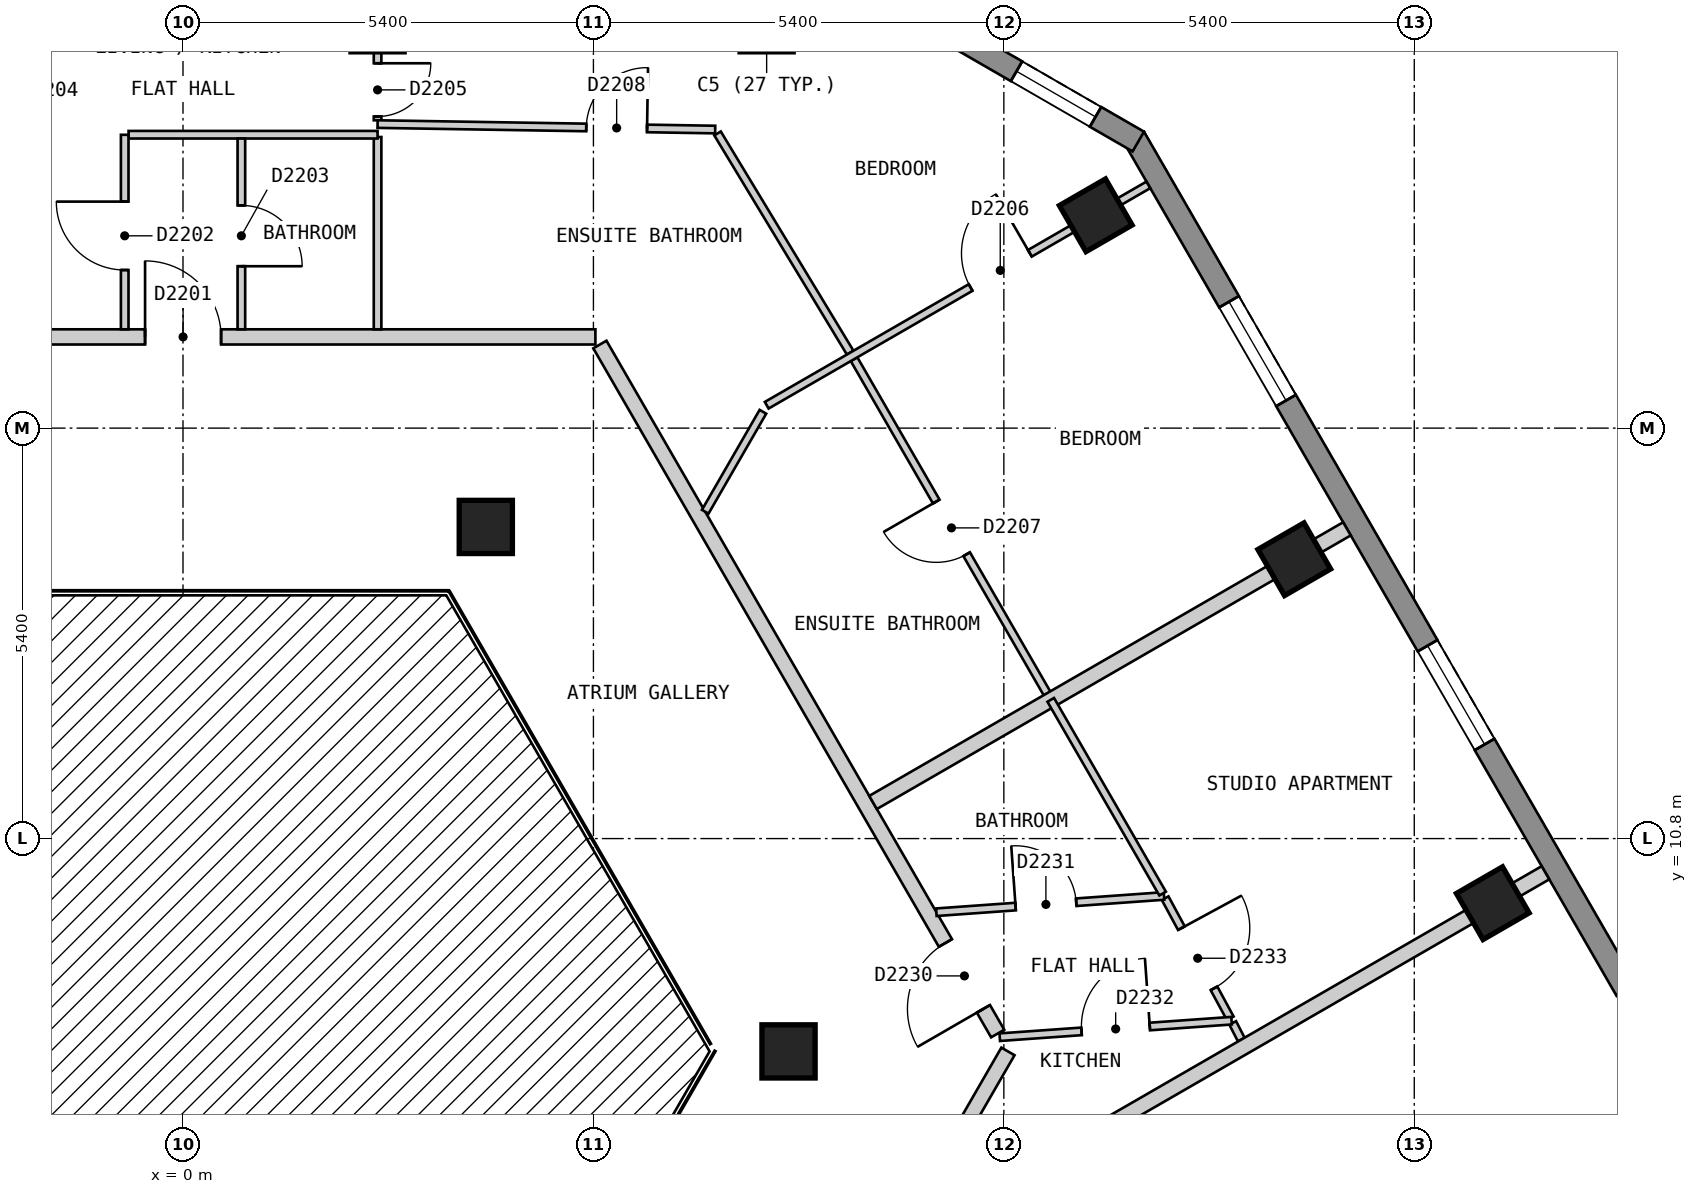
"""IFC4 building model, lengths in metres.
Left out: names, types, materials, properties, quantities, classifications, styles, units other than length and angle.
Written with IfcOpenShell. Run it as: python <this file> out.ifc"""

import sys

from ifc_helpers import new_model, si_unit, direction, frame, frame_2d, origin, origin_2d, place, context, subcontext, project, spatial, polyline, rectangle, outline, extrude, element, fill, save


model = new_model("IFC4")
c1 = context("Model", 3, precision=1e-05, world=origin(), true_north=direction((0.0, 1.0)))
c2 = subcontext(c1, "Body", "Model", "MODEL_VIEW")
j1 = project(units=[si_unit("LENGTHUNIT", "METRE"), si_unit("PLANEANGLEUNIT", "RADIAN")], contexts=[c1])
p1 = place(None, origin())
s1 = spatial("IfcSite", under=j1, at=p1, CompositionType="ELEMENT")
p2 = place(p1, origin())
s2 = spatial("IfcBuilding", under=s1, at=p2, CompositionType="ELEMENT")
p3 = place(p2, frame((0.0, 0.0, 223.8)))
s3 = spatial("IfcBuildingStorey", under=s2, at=p3, CompositionType="ELEMENT", Elevation=223.8)
for number, where, z_axis, x_axis in (
    (1, (17.233, 9.95, 0.0), (0.0, 0.0, 1.0), (-0.5, 0.866, 0.0)),
    (2, (14.621, 14.475, 0.0), (0.0, 0.0, 1.0), (-0.5, 0.866, 0.0)),
    (3, (12.009, 19.0, 0.0), (0.0, 0.0, 1.0), (-0.5, 0.866, 0.0)),
    (4, (7.967, 8.0, 0.0), (0.0, 0.0, 1.0), (1.0, 0.0, 0.0)),
    (5, (3.984, 14.9, 0.0), (0.0, 0.0, 1.0), (1.0, 0.0, 0.0)),
):
    element("IfcColumn", number, at=place(p3, frame(where, z_axis=z_axis, x_axis=x_axis)), inside=s3, PredefinedType="COLUMN", context=c2, shape_type="SweptSolid", body=[
        extrude(rectangle(XDim=0.7, YDim=0.7, at=origin_2d()), origin(), (0.0, 0.0, 1.0), 3.0),
    ])
p4 = place(p3, frame((23.599, 0.825, 0.0), z_axis=(0.0, 0.0, 1.0), x_axis=(-0.500003656944, 0.866023292436, 0.0)))
e6 = element("IfcWall", 6, at=p4, inside=s3, PredefinedType="SOLIDWALL", context=c2, shape_type="SweptSolid", body=[
    extrude(outline(polyline([(0.0, -0.15), (22.17, -0.15), (22.09, 0.15), (0.08, 0.15), (0.0, -0.15)])), origin(), (0.0, 0.0, 1.0), 2.7),
])
p5 = place(p4, frame((2.497, 0.0, 0.15)))
e7 = element("IfcOpeningElement", 7, at=p5, cuts=e6, PredefinedType="OPENING", context=c2, shape_type="SweptSolid", body=[
    extrude(rectangle(XDim=1.5, YDim=2.1, at=frame_2d((0.75, 1.05))), frame((0.0, 0.16, 0.0), z_axis=(0.0, -1.0, 0.0), x_axis=(1.0, 0.0, 0.0)), (0.0, 0.0, 1.0), 0.32),
])
p6 = place(p4, frame((7.723, 0.0, 0.15)))
e8 = element("IfcOpeningElement", 8, at=p6, cuts=e6, PredefinedType="OPENING", context=c2, shape_type="SweptSolid", body=[
    extrude(rectangle(XDim=1.5, YDim=2.1, at=frame_2d((0.75, 1.05))), frame((0.0, 0.16, 0.0), z_axis=(0.0, -1.0, 0.0), x_axis=(1.0, 0.0, 0.0)), (0.0, 0.0, 1.0), 0.32),
])
p7 = place(p4, frame((12.948, 0.0, 0.15)))
e9 = element("IfcOpeningElement", 9, at=p7, cuts=e6, PredefinedType="OPENING", context=c2, shape_type="SweptSolid", body=[
    extrude(rectangle(XDim=1.5, YDim=2.1, at=frame_2d((0.75, 1.05))), frame((0.0, 0.16, 0.0), z_axis=(0.0, -1.0, 0.0), x_axis=(1.0, 0.0, 0.0)), (0.0, 0.0, 1.0), 0.32),
])
p8 = place(p4, frame((18.173, 0.0, 0.15)))
e10 = element("IfcOpeningElement", 10, at=p8, cuts=e6, PredefinedType="OPENING", context=c2, shape_type="SweptSolid", body=[
    extrude(rectangle(XDim=1.5, YDim=2.1, at=frame_2d((0.75, 1.05))), frame((0.0, 0.16, 0.0), z_axis=(0.0, -1.0, 0.0), x_axis=(1.0, 0.0, 0.0)), (0.0, 0.0, 1.0), 0.32),
])
p9 = place(p3, frame((12.569, 19.97, 0.0), z_axis=(0.0, 0.0, 1.0), x_axis=(-0.866022959057, 0.500004234368, 0.0)))
e11 = element("IfcWall", 11, at=p9, inside=s3, PredefinedType="SOLIDWALL", context=c2, shape_type="SweptSolid", body=[
    extrude(outline(polyline([(0.0, -0.15), (5.0, -0.15), (4.92, 0.15), (0.08, 0.15), (0.0, -0.15)])), origin(), (0.0, 0.0, 1.0), 2.7),
])
p10 = place(p9, frame((0.65, 0.0, 0.15)))
e12 = element("IfcOpeningElement", 12, at=p10, cuts=e11, PredefinedType="OPENING", context=c2, shape_type="SweptSolid", body=[
    extrude(rectangle(XDim=1.2, YDim=2.1, at=frame_2d((0.6, 1.05))), frame((0.0, 0.16, 0.0), z_axis=(0.0, -1.0, 0.0), x_axis=(1.0, 0.0, 0.0)), (0.0, 0.0, 1.0), 0.32),
])
p11 = place(p3, frame((5.485, 17.3, 0.0), z_axis=(0.0, 0.0, 1.0), x_axis=(0.500017221754, -0.866015460572, 0.0)))
e13 = element("IfcWall", 13, at=p11, inside=s3, PredefinedType="PARTITIONING", context=c2, shape_type="SweptSolid", body=[
    extrude(rectangle(XDim=10.468, YDim=0.2, at=frame_2d((5.234, 0.0))), origin(), (0.0, 0.0, 1.0), 2.7),
])
p12 = place(p11, frame((9.092, 0.0, 0.0)))
e14 = element("IfcOpeningElement", 14, at=p12, cuts=e13, PredefinedType="OPENING", context=c2, shape_type="SweptSolid", body=[
    extrude(rectangle(XDim=1.0, YDim=2.1, at=frame_2d((0.5, 1.05))), frame((0.0, 0.11, 0.0), z_axis=(0.0, -1.0, 0.0), x_axis=(1.0, 0.0, 0.0)), (0.0, 0.0, 1.0), 0.22),
])
p13 = place(p3, frame((-5.311, 17.4, 0.0), z_axis=(0.0, 0.0, 1.0), x_axis=(1.0, 0.0, 0.0)))
e15 = element("IfcWall", 15, at=p13, inside=s3, PredefinedType="PARTITIONING", context=c2, shape_type="SweptSolid", body=[
    extrude(rectangle(XDim=10.737, YDim=0.2, at=frame_2d((5.369, 0.0))), origin(), (0.0, 0.0, 1.0), 2.7),
])
p14 = place(p13, frame((4.812, 0.0, 0.0)))
e16 = element("IfcOpeningElement", 16, at=p14, cuts=e15, PredefinedType="OPENING", context=c2, shape_type="SweptSolid", body=[
    extrude(rectangle(XDim=1.0, YDim=2.1, at=frame_2d((0.5, 1.05))), frame((0.0, 0.11, 0.0), z_axis=(0.0, -1.0, 0.0), x_axis=(1.0, 0.0, 0.0)), (0.0, 0.0, 1.0), 0.22),
])
p15 = place(p3, frame((9.354, 5.401, 0.0), z_axis=(0.0, 0.0, 1.0), x_axis=(0.499849222119, 0.866112437936, 0.0)))
e17 = element("IfcWall", 17, at=p15, inside=s3, PredefinedType="PARTITIONING", context=c2, shape_type="SweptSolid", body=[
    extrude(rectangle(XDim=3.001, YDim=0.2, at=frame_2d((1.5, 0.0))), origin(), (0.0, 0.0, 1.0), 2.7),
])
p16 = place(p3, frame((7.033, 20.077, 0.0), z_axis=(0.0, 0.0, 1.0), x_axis=(0.517730137343, -0.855543981854, 0.0)))
e18 = element("IfcWall", 18, at=p16, inside=s3, PredefinedType="PARTITIONING", context=c2, shape_type="SweptSolid", body=[
    extrude(rectangle(XDim=3.371, YDim=0.1, at=frame_2d((1.685, 0.0))), origin(), (0.0, 0.0, 1.0), 2.7),
])
p17 = place(p3, frame((8.829, 17.107, 0.0), z_axis=(0.0, 0.0, 1.0), x_axis=(0.500035512416, -0.866004899711, 0.0)))
e19 = element("IfcWall", 19, at=p17, inside=s3, PredefinedType="PARTITIONING", context=c2, shape_type="SweptSolid", body=[
    extrude(rectangle(XDim=5.175, YDim=0.1, at=frame_2d((2.588, 0.0))), origin(), (0.0, 0.0, 1.0), 2.7),
])
p18 = place(p17, frame((2.163, 0.0, 0.0)))
e20 = element("IfcOpeningElement", 20, at=p18, cuts=e19, PredefinedType="OPENING", context=c2, shape_type="SweptSolid", body=[
    extrude(rectangle(XDim=0.8, YDim=2.1, at=frame_2d((0.4, 1.05))), frame((0.0, 0.06, 0.0), z_axis=(0.0, -1.0, 0.0), x_axis=(1.0, 0.0, 0.0)), (0.0, 0.0, 1.0), 0.12),
])
p19 = place(p3, frame((12.922, 10.016, 0.0), z_axis=(0.0, 0.0, 1.0), x_axis=(0.476510550025, -0.879168752695, 0.0)))
e21 = element("IfcWall", 21, at=p19, inside=s3, PredefinedType="PARTITIONING", context=c2, shape_type="SweptSolid", body=[
    extrude(rectangle(XDim=1.798, YDim=0.1, at=frame_2d((0.899, 0.0))), origin(), (0.0, 0.0, 1.0), 2.7),
])
p20 = place(p19, frame((0.449, 0.0, 0.0)))
e22 = element("IfcOpeningElement", 22, at=p20, cuts=e21, PredefinedType="OPENING", context=c2, shape_type="SweptSolid", body=[
    extrude(rectangle(XDim=0.9, YDim=2.1, at=frame_2d((0.45, 1.05))), frame((0.0, 0.06, 0.0), z_axis=(0.0, -1.0, 0.0), x_axis=(1.0, 0.0, 0.0)), (0.0, 0.0, 1.0), 0.12),
])
p21 = place(p3, frame((13.811, 8.375, 0.0), z_axis=(0.0, 0.0, 1.0), x_axis=(0.457058020142, -0.889436881529, 0.0)))
e23 = element("IfcWall", 23, at=p21, inside=s3, PredefinedType="PARTITIONING", context=c2, shape_type="SweptSolid", body=[
    extrude(rectangle(XDim=0.247, YDim=0.1, at=frame_2d((0.124, 0.0))), origin(), (0.0, 0.0, 1.0), 2.7),
])
p22 = place(p3, frame((2.56, 22.3, 0.0), z_axis=(0.0, 0.0, 1.0), x_axis=(0.0, -1.0, 0.0)))
e24 = element("IfcWall", 24, at=p22, inside=s3, PredefinedType="PARTITIONING", context=c2, shape_type="SweptSolid", body=[
    extrude(rectangle(XDim=2.05, YDim=0.1, at=frame_2d((1.025, 0.0))), origin(), (0.0, 0.0, 1.0), 2.7),
])
p23 = place(p22, frame((1.3, 0.0, 0.0)))
e25 = element("IfcOpeningElement", 25, at=p23, cuts=e24, PredefinedType="OPENING", context=c2, shape_type="SweptSolid", body=[
    extrude(rectangle(XDim=0.7, YDim=2.1, at=frame_2d((0.35, 1.05))), frame((0.0, 0.06, 0.0), z_axis=(0.0, -1.0, 0.0), x_axis=(1.0, 0.0, 0.0)), (0.0, 0.0, 1.0), 0.12),
])
p24 = place(p3, frame((2.56, 20.03, 0.0), z_axis=(0.0, 0.0, 1.0), x_axis=(0.0, -1.0, 0.0)))
e26 = element("IfcWall", 26, at=p24, inside=s3, PredefinedType="PARTITIONING", context=c2, shape_type="SweptSolid", body=[
    extrude(rectangle(XDim=2.53, YDim=0.1, at=frame_2d((1.265, 0.0))), origin(), (0.0, 0.0, 1.0), 2.7),
])
p25 = place(p3, frame((2.56, 20.2, 0.0), z_axis=(0.0, 0.0, 1.0), x_axis=(0.999868576801, -0.016212005615, 0.0)))
e27 = element("IfcWall", 27, at=p25, inside=s3, PredefinedType="PARTITIONING", context=c2, shape_type="SweptSolid", body=[
    extrude(rectangle(XDim=4.442, YDim=0.1, at=frame_2d((2.221, 0.0))), origin(), (0.0, 0.0, 1.0), 2.7),
])
p26 = place(p25, frame((2.746, 0.0, 0.0)))
e28 = element("IfcOpeningElement", 28, at=p26, cuts=e27, PredefinedType="OPENING", context=c2, shape_type="SweptSolid", body=[
    extrude(rectangle(XDim=0.8, YDim=2.1, at=frame_2d((0.4, 1.05))), frame((0.0, 0.06, 0.0), z_axis=(0.0, -1.0, 0.0), x_axis=(1.0, 0.0, 0.0)), (0.0, 0.0, 1.0), 0.12),
])
p27 = place(p3, frame((-0.716, 20.06, 0.0), z_axis=(0.0, 0.0, 1.0), x_axis=(1.0, 0.0, 0.0)))
e29 = element("IfcWall", 29, at=p27, inside=s3, PredefinedType="PARTITIONING", context=c2, shape_type="SweptSolid", body=[
    extrude(rectangle(XDim=3.276, YDim=0.1, at=frame_2d((1.638, 0.0))), origin(), (0.0, 0.0, 1.0), 2.7),
])
p28 = place(p3, frame((6.871, 15.1, 0.0), z_axis=(0.0, 0.0, 1.0), x_axis=(0.499805980977, 0.866137391745, 0.0)))
e30 = element("IfcWall", 30, at=p28, inside=s3, PredefinedType="PARTITIONING", context=c2, shape_type="SweptSolid", body=[
    extrude(rectangle(XDim=1.518, YDim=0.1, at=frame_2d((0.759, 0.0))), origin(), (0.0, 0.0, 1.0), 2.7),
])
p29 = place(p3, frame((0.768, 17.5, 0.0), z_axis=(0.0, 0.0, 1.0), x_axis=(0.0, 1.0, 0.0)))
e31 = element("IfcWall", 31, at=p29, inside=s3, PredefinedType="PARTITIONING", context=c2, shape_type="SweptSolid", body=[
    extrude(rectangle(XDim=2.51, YDim=0.1, at=frame_2d((1.255, 0.0))), origin(), (0.0, 0.0, 1.0), 2.7),
])
p30 = place(p29, frame((0.83, 0.0, 0.0)))
e32 = element("IfcOpeningElement", 32, at=p30, cuts=e31, PredefinedType="OPENING", context=c2, shape_type="SweptSolid", body=[
    extrude(rectangle(XDim=0.8, YDim=2.1, at=frame_2d((0.4, 1.05))), frame((0.0, 0.06, 0.0), z_axis=(0.0, -1.0, 0.0), x_axis=(1.0, 0.0, 0.0)), (0.0, 0.0, 1.0), 0.12),
])
p31 = place(p3, frame((-0.767, 17.5, 0.0), z_axis=(0.0, 0.0, 1.0), x_axis=(0.0, 1.0, 0.0)))
e33 = element("IfcWall", 33, at=p31, inside=s3, PredefinedType="PARTITIONING", context=c2, shape_type="SweptSolid", body=[
    extrude(rectangle(XDim=2.559, YDim=0.1, at=frame_2d((1.28, 0.0))), origin(), (0.0, 0.0, 1.0), 2.7),
])
p32 = place(p31, frame((0.78, 0.0, 0.0)))
e34 = element("IfcOpeningElement", 34, at=p32, cuts=e33, PredefinedType="OPENING", context=c2, shape_type="SweptSolid", body=[
    extrude(rectangle(XDim=0.9, YDim=2.1, at=frame_2d((0.45, 1.05))), frame((0.0, 0.06, 0.0), z_axis=(0.0, -1.0, 0.0), x_axis=(1.0, 0.0, 0.0)), (0.0, 0.0, 1.0), 0.12),
])
p33 = place(p3, frame((7.68, 16.501, 0.0), z_axis=(0.0, 0.0, 1.0), x_axis=(0.86602149507, 0.500006770031, 0.0)))
e35 = element("IfcWall", 35, at=p33, inside=s3, PredefinedType="PARTITIONING", context=c2, shape_type="SweptSolid", body=[
    extrude(rectangle(XDim=5.798, YDim=0.1, at=frame_2d((2.899, 0.0))), origin(), (0.0, 0.0, 1.0), 2.7),
])
p34 = place(p33, frame((3.098, 0.0, 0.0)))
e36 = element("IfcOpeningElement", 36, at=p34, cuts=e35, PredefinedType="OPENING", context=c2, shape_type="SweptSolid", body=[
    extrude(rectangle(XDim=0.9, YDim=2.1, at=frame_2d((0.45, 1.05))), frame((0.0, 0.06, 0.0), z_axis=(0.0, -1.0, 0.0), x_axis=(1.0, 0.0, 0.0)), (0.0, 0.0, 1.0), 0.12),
])
p35 = place(p3, frame((10.746, 8.187, 0.0), z_axis=(0.0, 0.0, 1.0), x_axis=(0.997477310687, 0.070986017387, 0.0)))
e37 = element("IfcWall", 37, at=p35, inside=s3, PredefinedType="PARTITIONING", context=c2, shape_type="SweptSolid", body=[
    extrude(rectangle(XDim=3.058, YDim=0.1, at=frame_2d((1.529, 0.0))), origin(), (0.0, 0.0, 1.0), 2.7),
])
p36 = place(p35, frame((1.079, 0.0, 0.0)))
e38 = element("IfcOpeningElement", 38, at=p36, cuts=e37, PredefinedType="OPENING", context=c2, shape_type="SweptSolid", body=[
    extrude(rectangle(XDim=0.9, YDim=2.1, at=frame_2d((0.45, 1.05))), frame((0.0, 0.06, 0.0), z_axis=(0.0, -1.0, 0.0), x_axis=(1.0, 0.0, 0.0)), (0.0, 0.0, 1.0), 0.12),
])
p37 = place(p3, frame((9.912, 9.831, 0.0), z_axis=(0.0, 0.0, 1.0), x_axis=(0.997459937941, 0.071229714326, 0.0)))
e39 = element("IfcWall", 39, at=p37, inside=s3, PredefinedType="PARTITIONING", context=c2, shape_type="SweptSolid", body=[
    extrude(rectangle(XDim=3.002, YDim=0.1, at=frame_2d((1.501, 0.0))), origin(), (0.0, 0.0, 1.0), 2.7),
])
p38 = place(p37, frame((1.045, 0.0, 0.0)))
e40 = element("IfcOpeningElement", 40, at=p38, cuts=e39, PredefinedType="OPENING", context=c2, shape_type="SweptSolid", body=[
    extrude(rectangle(XDim=0.8, YDim=2.1, at=frame_2d((0.4, 1.05))), frame((0.0, 0.06, 0.0), z_axis=(0.0, -1.0, 0.0), x_axis=(1.0, 0.0, 0.0)), (0.0, 0.0, 1.0), 0.12),
])
p39 = place(p3, frame((9.457, 5.461, 0.0), z_axis=(0.0, 0.0, 1.0), x_axis=(0.866043818878, 0.499968102766, 0.0)))
e41 = element("IfcWall", 41, at=p39, inside=s3, PredefinedType="PARTITIONING", context=c2, shape_type="SweptSolid", body=[
    extrude(rectangle(XDim=9.779, YDim=0.2, at=frame_2d((4.89, 0.0))), origin(), (0.0, 0.0, 1.0), 2.7),
])
p40 = place(p3, frame((9.079, 11.275, 0.0), z_axis=(0.0, 0.0, 1.0), x_axis=(0.866001485781, 0.500041424909, 0.0)))
e42 = element("IfcWall", 42, at=p40, inside=s3, PredefinedType="PARTITIONING", context=c2, shape_type="SweptSolid", body=[
    extrude(rectangle(XDim=7.2, YDim=0.2, at=frame_2d((3.6, 0.0))), origin(), (0.0, 0.0, 1.0), 2.7),
])
p41 = place(p3, frame((11.417, 12.625, 0.0), z_axis=(0.0, 0.0, 1.0), x_axis=(0.500055103712, -0.865993587304, 0.0)))
e43 = element("IfcWall", 43, at=p41, inside=s3, PredefinedType="PARTITIONING", context=c2, shape_type="SweptSolid", body=[
    extrude(rectangle(XDim=2.944, YDim=0.1, at=frame_2d((1.472, 0.0))), origin(), (0.0, 0.0, 1.0), 2.7),
])
p42 = place(p7, origin())
e44 = element("IfcWindow", 44, at=p42, inside=s3, PartitioningType="SINGLE_PANEL", PredefinedType="WINDOW", context=c2, shape_type="SweptSolid", body=[
    extrude(rectangle(XDim=1.5, YDim=2.1, at=frame_2d((0.75, 1.05))), frame((0.0, 0.03, 0.0), z_axis=(0.0, -1.0, 0.0), x_axis=(1.0, 0.0, 0.0)), (0.0, 0.0, 1.0), 0.06),
])
fill(e9, e44)
p43 = place(p8, origin())
e45 = element("IfcWindow", 45, at=p43, inside=s3, PartitioningType="SINGLE_PANEL", PredefinedType="WINDOW", context=c2, shape_type="SweptSolid", body=[
    extrude(rectangle(XDim=1.5, YDim=2.1, at=frame_2d((0.75, 1.05))), frame((0.0, 0.03, 0.0), z_axis=(0.0, -1.0, 0.0), x_axis=(1.0, 0.0, 0.0)), (0.0, 0.0, 1.0), 0.06),
])
fill(e10, e45)
p44 = place(p10, origin())
e46 = element("IfcWindow", 46, at=p44, inside=s3, PartitioningType="SINGLE_PANEL", PredefinedType="WINDOW", context=c2, shape_type="SweptSolid", body=[
    extrude(rectangle(XDim=1.2, YDim=2.1, at=frame_2d((0.6, 1.05))), frame((0.0, 0.03, 0.0), z_axis=(0.0, -1.0, 0.0), x_axis=(1.0, 0.0, 0.0)), (0.0, 0.0, 1.0), 0.06),
])
fill(e12, e46)
p45 = place(p14, origin())
e47 = element("IfcDoor", 47, at=p45, inside=s3, OperationType="SINGLE_SWING_LEFT", PredefinedType="DOOR", context=c2, shape_type="SweptSolid", body=[
    extrude(rectangle(XDim=1.0, YDim=2.1, at=frame_2d((0.5, 1.05))), frame((0.0, 0.025, 0.0), z_axis=(0.0, -1.0, 0.0), x_axis=(1.0, 0.0, 0.0)), (0.0, 0.0, 1.0), 0.05),
])
fill(e16, e47)
p46 = place(p32, origin())
e48 = element("IfcDoor", 48, at=p46, inside=s3, OperationType="SINGLE_SWING_RIGHT", PredefinedType="DOOR", context=c2, shape_type="SweptSolid", body=[
    extrude(rectangle(XDim=0.9, YDim=2.1, at=frame_2d((0.45, 1.05))), frame((0.0, 0.025, 0.0), z_axis=(0.0, -1.0, 0.0), x_axis=(1.0, 0.0, 0.0)), (0.0, 0.0, 1.0), 0.05),
])
fill(e34, e48)
p47 = place(p30, origin())
e49 = element("IfcDoor", 49, at=p47, inside=s3, OperationType="SINGLE_SWING_LEFT", PredefinedType="DOOR", context=c2, shape_type="SweptSolid", body=[
    extrude(rectangle(XDim=0.8, YDim=2.1, at=frame_2d((0.4, 1.05))), frame((0.0, 0.025, 0.0), z_axis=(0.0, -1.0, 0.0), x_axis=(1.0, 0.0, 0.0)), (0.0, 0.0, 1.0), 0.05),
])
fill(e32, e49)
p48 = place(p23, origin())
e50 = element("IfcDoor", 50, at=p48, inside=s3, OperationType="SINGLE_SWING_LEFT", PredefinedType="DOOR", context=c2, shape_type="SweptSolid", body=[
    extrude(rectangle(XDim=0.7, YDim=2.1, at=frame_2d((0.35, 1.05))), frame((0.0, 0.025, 0.0), z_axis=(0.0, -1.0, 0.0), x_axis=(1.0, 0.0, 0.0)), (0.0, 0.0, 1.0), 0.05),
])
fill(e25, e50)
p49 = place(p34, origin())
e51 = element("IfcDoor", 51, at=p49, inside=s3, OperationType="SINGLE_SWING_RIGHT", PredefinedType="DOOR", context=c2, shape_type="SweptSolid", body=[
    extrude(rectangle(XDim=0.9, YDim=2.1, at=frame_2d((0.45, 1.05))), frame((0.0, 0.025, 0.0), z_axis=(0.0, -1.0, 0.0), x_axis=(1.0, 0.0, 0.0)), (0.0, 0.0, 1.0), 0.05),
])
fill(e36, e51)
p50 = place(p18, origin())
e52 = element("IfcDoor", 52, at=p50, inside=s3, OperationType="SINGLE_SWING_LEFT", PredefinedType="DOOR", context=c2, shape_type="SweptSolid", body=[
    extrude(rectangle(XDim=0.8, YDim=2.1, at=frame_2d((0.4, 1.05))), frame((0.0, 0.025, 0.0), z_axis=(0.0, -1.0, 0.0), x_axis=(1.0, 0.0, 0.0)), (0.0, 0.0, 1.0), 0.05),
])
fill(e20, e52)
p51 = place(p26, origin())
e53 = element("IfcDoor", 53, at=p51, inside=s3, OperationType="SINGLE_SWING_RIGHT", PredefinedType="DOOR", context=c2, shape_type="SweptSolid", body=[
    extrude(rectangle(XDim=0.8, YDim=2.1, at=frame_2d((0.4, 1.05))), frame((0.0, 0.025, 0.0), z_axis=(0.0, -1.0, 0.0), x_axis=(1.0, 0.0, 0.0)), (0.0, 0.0, 1.0), 0.05),
])
fill(e28, e53)
p52 = place(p12, origin())
e54 = element("IfcDoor", 54, at=p52, inside=s3, OperationType="SINGLE_SWING_RIGHT", PredefinedType="DOOR", context=c2, shape_type="SweptSolid", body=[
    extrude(rectangle(XDim=1.0, YDim=2.1, at=frame_2d((0.5, 1.05))), frame((0.0, 0.025, 0.0), z_axis=(0.0, -1.0, 0.0), x_axis=(1.0, 0.0, 0.0)), (0.0, 0.0, 1.0), 0.05),
])
fill(e14, e54)
p53 = place(p38, origin())
e55 = element("IfcDoor", 55, at=p53, inside=s3, OperationType="SINGLE_SWING_LEFT", PredefinedType="DOOR", context=c2, shape_type="SweptSolid", body=[
    extrude(rectangle(XDim=0.8, YDim=2.1, at=frame_2d((0.4, 1.05))), frame((0.0, 0.025, 0.0), z_axis=(0.0, -1.0, 0.0), x_axis=(1.0, 0.0, 0.0)), (0.0, 0.0, 1.0), 0.05),
])
fill(e40, e55)
p54 = place(p36, origin())
e56 = element("IfcDoor", 56, at=p54, inside=s3, OperationType="SINGLE_SWING_RIGHT", PredefinedType="DOOR", context=c2, shape_type="SweptSolid", body=[
    extrude(rectangle(XDim=0.9, YDim=2.1, at=frame_2d((0.45, 1.05))), frame((0.0, 0.025, 0.0), z_axis=(0.0, -1.0, 0.0), x_axis=(1.0, 0.0, 0.0)), (0.0, 0.0, 1.0), 0.05),
])
fill(e38, e56)
p55 = place(p20, origin())
e57 = element("IfcDoor", 57, at=p55, inside=s3, OperationType="SINGLE_SWING_LEFT", PredefinedType="DOOR", context=c2, shape_type="SweptSolid", body=[
    extrude(rectangle(XDim=0.9, YDim=2.1, at=frame_2d((0.45, 1.05))), frame((0.0, 0.025, 0.0), z_axis=(0.0, -1.0, 0.0), x_axis=(1.0, 0.0, 0.0)), (0.0, 0.0, 1.0), 0.05),
])
fill(e22, e57)
save(model, sys.argv[1])
